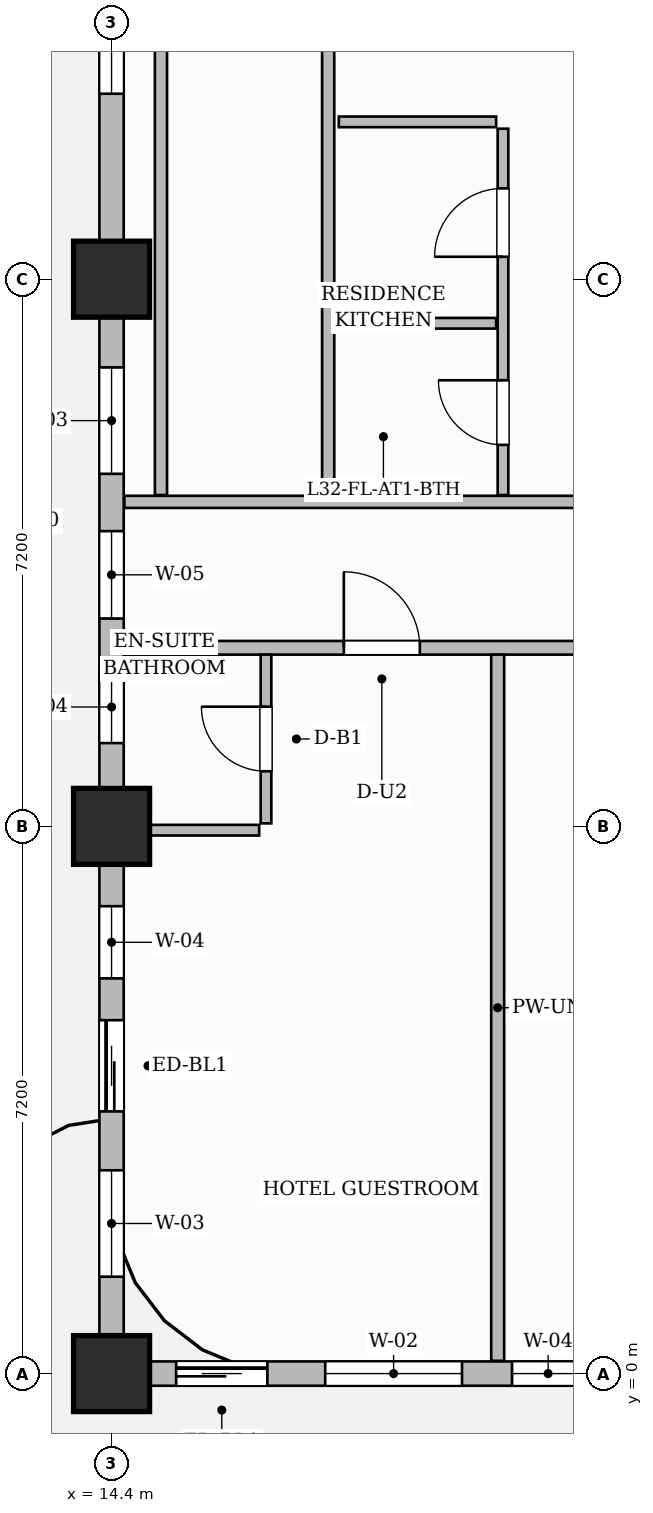
"""IFC4 building model, lengths in metres.
Left out: names, types, materials, properties, quantities, classifications, styles, units other than length and angle.
Written with IfcOpenShell. Run it as: python <this file> out.ifc"""

import sys

from ifc_helpers import new_model, si_unit, direction, frame, frame_2d, origin, origin_2d, place, context, subcontext, project, spatial, rectangle, extrude, source, transform, mapped, element, fill, save


model = new_model("IFC4")
c1 = context("Model", 3, precision=1e-05, world=origin(), true_north=direction((0.0, 1.0)))
c2 = subcontext(c1, "Body", "Model", "MODEL_VIEW")
j1 = project(units=[si_unit("LENGTHUNIT", "METRE"), si_unit("PLANEANGLEUNIT", "RADIAN")], contexts=[c1])
p1 = place(None, origin())
s1 = spatial("IfcSite", under=j1, at=p1, CompositionType="ELEMENT")
p2 = place(p1, origin())
s2 = spatial("IfcBuilding", under=s1, at=p2, CompositionType="ELEMENT")
p3 = place(p2, frame((0.0, 0.0, 130.3)))
s3 = spatial("IfcBuildingStorey", under=s2, at=p3, CompositionType="ELEMENT", Elevation=130.3)
m1 = source(origin(), c2, "Body", "SweptSolid", [
    extrude(rectangle(XDim=1.0, YDim=1.0, at=origin_2d()), origin(), (0.0, 0.0, 1.0), 3.7),
])
for number, where, z_axis, x_axis in (
    (1, (14.4, 0.0, 0.0), (0.0, 0.0, 1.0), (1.0, 0.0, 0.0)),
    (2, (14.4, 7.2, 0.0), (0.0, 0.0, 1.0), (1.0, 0.0, 0.0)),
    (3, (14.4, 14.4, 0.0), (0.0, 0.0, 1.0), (1.0, 0.0, 0.0)),
):
    element("IfcColumn", number, at=place(p3, frame(where, z_axis=z_axis, x_axis=x_axis)), inside=s3, PredefinedType="COLUMN", context=c2, shape_type="MappedRepresentation", body=[
        mapped(m1, transform((0.0, 0.0, 0.0), scale=1.0)),
    ])
p4 = place(p3, frame((14.568, 9.55, 0.0), z_axis=(0.0, 0.0, 1.0), x_axis=(1.0, 0.0, 0.0)))
e4 = element("IfcWall", 4, at=p4, inside=s3, PredefinedType="PARTITIONING", context=c2, shape_type="SweptSolid", body=[
    extrude(rectangle(XDim=15.542, YDim=0.18, at=frame_2d((7.771, 0.0))), origin(), (0.0, 0.0, 1.0), 3.45),
])
p5 = place(p4, frame((2.888, 0.0, 0.0)))
e5 = element("IfcOpeningElement", 5, at=p5, cuts=e4, PredefinedType="OPENING", context=c2, shape_type="SweptSolid", body=[
    extrude(rectangle(XDim=1.0, YDim=2.2, at=frame_2d((0.5, 1.1))), frame((0.0, 0.1, 0.0), z_axis=(0.0, -1.0, 0.0), x_axis=(1.0, 0.0, 0.0)), (0.0, 0.0, 1.0), 0.2),
])
p6 = place(p4, frame((5.965, 0.0, 0.0)))
e6 = element("IfcOpeningElement", 6, at=p6, cuts=e4, PredefinedType="OPENING", context=c2, shape_type="SweptSolid", body=[
    extrude(rectangle(XDim=1.05, YDim=2.25, at=frame_2d((0.525, 1.125))), frame((0.0, 0.1, 0.0), z_axis=(0.0, -1.0, 0.0), x_axis=(1.0, 0.0, 0.0)), (0.0, 0.0, 1.0), 0.2),
])
p7 = place(p4, frame((13.7, 0.0, 0.0)))
e7 = element("IfcOpeningElement", 7, at=p7, cuts=e4, PredefinedType="OPENING", context=c2, shape_type="SweptSolid", body=[
    extrude(rectangle(XDim=1.0, YDim=2.2, at=frame_2d((0.5, 1.1))), frame((0.0, 0.1, 0.0), z_axis=(0.0, -1.0, 0.0), x_axis=(1.0, 0.0, 0.0)), (0.0, 0.0, 1.0), 0.2),
])
p8 = place(p3, frame((14.568, 11.47, 0.0), z_axis=(0.0, 0.0, 1.0), x_axis=(1.0, 0.0, 0.0)))
e8 = element("IfcWall", 8, at=p8, inside=s3, PredefinedType="PARTITIONING", context=c2, shape_type="SweptSolid", body=[
    extrude(rectangle(XDim=15.542, YDim=0.16, at=frame_2d((7.771, 0.0))), origin(), (0.0, 0.0, 1.0), 3.45),
])
p9 = place(p8, frame((7.122, 0.0, 0.0)))
e9 = element("IfcOpeningElement", 9, at=p9, cuts=e8, PredefinedType="OPENING", context=c2, shape_type="SweptSolid", body=[
    extrude(rectangle(XDim=1.05, YDim=2.25, at=frame_2d((0.525, 1.125))), frame((0.0, 0.09, 0.0), z_axis=(0.0, -1.0, 0.0), x_axis=(1.0, 0.0, 0.0)), (0.0, 0.0, 1.0), 0.18),
])
p10 = place(p3, frame((19.48, 0.168, 0.0), z_axis=(0.0, 0.0, 1.0), x_axis=(0.0, 1.0, 0.0)))
e10 = element("IfcWall", 10, at=p10, inside=s3, PredefinedType="PARTITIONING", context=c2, shape_type="SweptSolid", body=[
    extrude(rectangle(XDim=9.292, YDim=0.17, at=frame_2d((4.646, 0.0))), origin(), (0.0, 0.0, 1.0), 3.45),
])
p11 = place(p3, frame((16.432, 7.24, 0.0), z_axis=(0.0, 0.0, 1.0), x_axis=(0.0, 1.0, 0.0)))
e11 = element("IfcWall", 11, at=p11, inside=s3, PredefinedType="PARTITIONING", context=c2, shape_type="SweptSolid", body=[
    extrude(rectangle(XDim=2.22, YDim=0.14, at=frame_2d((1.11, 0.0))), origin(), (0.0, 0.0, 1.0), 3.45),
])
p12 = place(p11, frame((0.685, 0.0, 0.0)))
e12 = element("IfcOpeningElement", 12, at=p12, cuts=e11, PredefinedType="OPENING", context=c2, shape_type="SweptSolid", body=[
    extrude(rectangle(XDim=0.85, YDim=2.1, at=frame_2d((0.425, 1.05))), frame((0.0, 0.08, 0.0), z_axis=(0.0, -1.0, 0.0), x_axis=(1.0, 0.0, 0.0)), (0.0, 0.0, 1.0), 0.16),
])
p13 = place(p3, frame((14.49, 7.15, 0.0), z_axis=(0.0, 0.0, 1.0), x_axis=(1.0, 0.0, 0.0)))
e13 = element("IfcWall", 13, at=p13, inside=s3, PredefinedType="PARTITIONING", context=c2, shape_type="SweptSolid", body=[
    extrude(rectangle(XDim=1.852, YDim=0.14, at=frame_2d((0.926, 0.0))), origin(), (0.0, 0.0, 1.0), 2.935),
])
for number, where, z_axis, x_axis in (
    (14, (15.05, 11.56, 0.0), (0.0, 0.0, 1.0), (0.0, 1.0, 0.0)),
    (15, (17.25, 11.56, 0.0), (0.0, 0.0, 1.0), (0.0, 1.0, 0.0)),
):
    element("IfcWall", number, at=place(p3, frame(where, z_axis=z_axis, x_axis=x_axis)), inside=s3, PredefinedType="PARTITIONING", context=c2, shape_type="SweptSolid", body=[
        extrude(rectangle(XDim=13.55, YDim=0.16, at=frame_2d((6.775, 0.0))), origin(), (0.0, 0.0, 1.0), 3.45),
    ])
p14 = place(p3, frame((19.55, 11.56, 0.0), z_axis=(0.0, 0.0, 1.0), x_axis=(0.0, 1.0, 0.0)))
e16 = element("IfcWall", 16, at=p14, inside=s3, PredefinedType="PARTITIONING", context=c2, shape_type="SweptSolid", body=[
    extrude(rectangle(XDim=4.82, YDim=0.14, at=frame_2d((2.41, 0.0))), origin(), (0.0, 0.0, 1.0), 3.45),
])
p15 = place(p14, frame((0.66, 0.0, 0.0)))
e17 = element("IfcOpeningElement", 17, at=p15, cuts=e16, PredefinedType="OPENING", context=c2, shape_type="SweptSolid", body=[
    extrude(rectangle(XDim=0.85, YDim=2.1, at=frame_2d((0.425, 1.05))), frame((0.0, 0.08, 0.0), z_axis=(0.0, -1.0, 0.0), x_axis=(1.0, 0.0, 0.0)), (0.0, 0.0, 1.0), 0.16),
])
p16 = place(p14, frame((3.135, 0.0, 0.0)))
e18 = element("IfcOpeningElement", 18, at=p16, cuts=e16, PredefinedType="OPENING", context=c2, shape_type="SweptSolid", body=[
    extrude(rectangle(XDim=0.9, YDim=2.15, at=frame_2d((0.45, 1.075))), frame((0.0, 0.08, 0.0), z_axis=(0.0, -1.0, 0.0), x_axis=(1.0, 0.0, 0.0)), (0.0, 0.0, 1.0), 0.16),
])
for number, where, z_axis, x_axis in (
    (19, (17.39, 13.82, 0.0), (0.0, 0.0, 1.0), (1.0, 0.0, 0.0)),
    (20, (17.39, 16.47, 0.0), (0.0, 0.0, 1.0), (1.0, 0.0, 0.0)),
):
    element("IfcWall", number, at=place(p3, frame(where, z_axis=z_axis, x_axis=x_axis)), inside=s3, PredefinedType="PARTITIONING", context=c2, shape_type="SweptSolid", body=[
        extrude(rectangle(XDim=2.07, YDim=0.14, at=frame_2d((1.035, 0.0))), origin(), (0.0, 0.0, 1.0), 3.45),
    ])
p17 = place(p3, frame((14.4, 0.0, 0.0), z_axis=(0.0, 0.0, 1.0), x_axis=(1.0, 0.0, 0.0)))
e21 = element("IfcWall", 21, at=p17, inside=s3, PredefinedType="SOLIDWALL", context=c2, shape_type="SweptSolid", body=[
    extrude(rectangle(XDim=35.4, YDim=0.32, at=frame_2d((17.7, 0.0))), origin(), (0.0, 0.0, 1.0), 2.935),
])
p18 = place(p17, frame((0.85, 0.0, 0.0)))
e22 = element("IfcOpeningElement", 22, at=p18, cuts=e21, PredefinedType="OPENING", context=c2, shape_type="SweptSolid", body=[
    extrude(rectangle(XDim=1.2, YDim=2.2, at=frame_2d((0.6, 1.1))), frame((0.0, 0.17, 0.0), z_axis=(0.0, -1.0, 0.0), x_axis=(1.0, 0.0, 0.0)), (0.0, 0.0, 1.0), 0.34),
])
p19 = place(p17, frame((2.811, 0.0, 0.8)))
e23 = element("IfcOpeningElement", 23, at=p19, cuts=e21, PredefinedType="OPENING", context=c2, shape_type="SweptSolid", body=[
    extrude(rectangle(XDim=1.8, YDim=1.85, at=frame_2d((0.9, 0.925))), frame((0.0, 0.17, 0.0), z_axis=(0.0, -1.0, 0.0), x_axis=(1.0, 0.0, 0.0)), (0.0, 0.0, 1.0), 0.34),
])
p20 = place(p17, frame((5.269, 0.0, 0.8)))
e24 = element("IfcOpeningElement", 24, at=p20, cuts=e21, PredefinedType="OPENING", context=c2, shape_type="SweptSolid", body=[
    extrude(rectangle(XDim=0.95, YDim=1.75, at=frame_2d((0.475, 0.875))), frame((0.0, 0.17, 0.0), z_axis=(0.0, -1.0, 0.0), x_axis=(1.0, 0.0, 0.0)), (0.0, 0.0, 1.0), 0.34),
])
p21 = place(p17, frame((8.389, 0.0, 0.8)))
e25 = element("IfcOpeningElement", 25, at=p21, cuts=e21, PredefinedType="OPENING", context=c2, shape_type="SweptSolid", body=[
    extrude(rectangle(XDim=1.8, YDim=1.85, at=frame_2d((0.9, 0.925))), frame((0.0, 0.17, 0.0), z_axis=(0.0, -1.0, 0.0), x_axis=(1.0, 0.0, 0.0)), (0.0, 0.0, 1.0), 0.34),
])
p22 = place(p17, frame((11.197, 0.0, 0.8)))
e26 = element("IfcOpeningElement", 26, at=p22, cuts=e21, PredefinedType="OPENING", context=c2, shape_type="SweptSolid", body=[
    extrude(rectangle(XDim=1.8, YDim=1.85, at=frame_2d((0.9, 0.925))), frame((0.0, 0.17, 0.0), z_axis=(0.0, -1.0, 0.0), x_axis=(1.0, 0.0, 0.0)), (0.0, 0.0, 1.0), 0.34),
])
p23 = place(p17, frame((16.804, 0.0, 0.8)))
e27 = element("IfcOpeningElement", 27, at=p23, cuts=e21, PredefinedType="OPENING", context=c2, shape_type="SweptSolid", body=[
    extrude(rectangle(XDim=1.8, YDim=1.85, at=frame_2d((0.9, 0.925))), frame((0.0, 0.17, 0.0), z_axis=(0.0, -1.0, 0.0), x_axis=(1.0, 0.0, 0.0)), (0.0, 0.0, 1.0), 0.34),
])
p24 = place(p17, frame((22.396, 0.0, 0.8)))
e28 = element("IfcOpeningElement", 28, at=p24, cuts=e21, PredefinedType="OPENING", context=c2, shape_type="SweptSolid", body=[
    extrude(rectangle(XDim=1.8, YDim=1.85, at=frame_2d((0.9, 0.925))), frame((0.0, 0.17, 0.0), z_axis=(0.0, -1.0, 0.0), x_axis=(1.0, 0.0, 0.0)), (0.0, 0.0, 1.0), 0.34),
])
p25 = place(p17, frame((25.629, 0.0, 0.8)))
e29 = element("IfcOpeningElement", 29, at=p25, cuts=e21, PredefinedType="OPENING", context=c2, shape_type="SweptSolid", body=[
    extrude(rectangle(XDim=0.95, YDim=1.75, at=frame_2d((0.475, 0.875))), frame((0.0, 0.17, 0.0), z_axis=(0.0, -1.0, 0.0), x_axis=(1.0, 0.0, 0.0)), (0.0, 0.0, 1.0), 0.34),
])
p26 = place(p17, frame((29.075, 0.0, 0.8)))
e30 = element("IfcOpeningElement", 30, at=p26, cuts=e21, PredefinedType="OPENING", context=c2, shape_type="SweptSolid", body=[
    extrude(rectangle(XDim=1.8, YDim=1.85, at=frame_2d((0.9, 0.925))), frame((0.0, 0.17, 0.0), z_axis=(0.0, -1.0, 0.0), x_axis=(1.0, 0.0, 0.0)), (0.0, 0.0, 1.0), 0.34),
])
p27 = place(p17, frame((32.125, 0.0, 0.8)))
e31 = element("IfcOpeningElement", 31, at=p27, cuts=e21, PredefinedType="OPENING", context=c2, shape_type="SweptSolid", body=[
    extrude(rectangle(XDim=1.8, YDim=1.85, at=frame_2d((0.9, 0.925))), frame((0.0, 0.17, 0.0), z_axis=(0.0, -1.0, 0.0), x_axis=(1.0, 0.0, 0.0)), (0.0, 0.0, 1.0), 0.34),
])
p28 = place(p3, frame((14.4, 0.05, 0.0), z_axis=(0.0, 0.0, 1.0), x_axis=(0.0, 1.0, 0.0)))
e32 = element("IfcWall", 32, at=p28, inside=s3, PredefinedType="SOLIDWALL", context=c2, shape_type="SweptSolid", body=[
    extrude(rectangle(XDim=20.6, YDim=0.32, at=frame_2d((10.3, 0.0))), origin(), (0.0, 0.0, 1.0), 2.935),
])
p29 = place(p28, frame((3.4, 0.0, 0.0)))
e33 = element("IfcOpeningElement", 33, at=p29, cuts=e32, PredefinedType="OPENING", context=c2, shape_type="SweptSolid", body=[
    extrude(rectangle(XDim=1.2, YDim=2.2, at=frame_2d((0.6, 1.1))), frame((0.0, 0.17, 0.0), z_axis=(0.0, -1.0, 0.0), x_axis=(1.0, 0.0, 0.0)), (0.0, 0.0, 1.0), 0.34),
])
p30 = place(p28, frame((1.225, 0.0, 0.8)))
e34 = element("IfcOpeningElement", 34, at=p30, cuts=e32, PredefinedType="OPENING", context=c2, shape_type="SweptSolid", body=[
    extrude(rectangle(XDim=1.4, YDim=1.85, at=frame_2d((0.7, 0.925))), frame((0.0, 0.17, 0.0), z_axis=(0.0, -1.0, 0.0), x_axis=(1.0, 0.0, 0.0)), (0.0, 0.0, 1.0), 0.34),
])
p31 = place(p28, frame((5.15, 0.0, 0.8)))
e35 = element("IfcOpeningElement", 35, at=p31, cuts=e32, PredefinedType="OPENING", context=c2, shape_type="SweptSolid", body=[
    extrude(rectangle(XDim=0.95, YDim=1.75, at=frame_2d((0.475, 0.875))), frame((0.0, 0.17, 0.0), z_axis=(0.0, -1.0, 0.0), x_axis=(1.0, 0.0, 0.0)), (0.0, 0.0, 1.0), 0.34),
])
p32 = place(p28, frame((8.246, 0.0, 0.8)))
e36 = element("IfcOpeningElement", 36, at=p32, cuts=e32, PredefinedType="OPENING", context=c2, shape_type="SweptSolid", body=[
    extrude(rectangle(XDim=0.95, YDim=1.75, at=frame_2d((0.475, 0.875))), frame((0.0, 0.17, 0.0), z_axis=(0.0, -1.0, 0.0), x_axis=(1.0, 0.0, 0.0)), (0.0, 0.0, 1.0), 0.34),
])
p33 = place(p28, frame((9.885, 0.0, 0.8)))
e37 = element("IfcOpeningElement", 37, at=p33, cuts=e32, PredefinedType="OPENING", context=c2, shape_type="SweptSolid", body=[
    extrude(rectangle(XDim=1.15, YDim=1.8, at=frame_2d((0.575, 0.9))), frame((0.0, 0.17, 0.0), z_axis=(0.0, -1.0, 0.0), x_axis=(1.0, 0.0, 0.0)), (0.0, 0.0, 1.0), 0.34),
])
p34 = place(p28, frame((11.789, 0.0, 0.8)))
e38 = element("IfcOpeningElement", 38, at=p34, cuts=e32, PredefinedType="OPENING", context=c2, shape_type="SweptSolid", body=[
    extrude(rectangle(XDim=1.4, YDim=1.85, at=frame_2d((0.7, 0.925))), frame((0.0, 0.17, 0.0), z_axis=(0.0, -1.0, 0.0), x_axis=(1.0, 0.0, 0.0)), (0.0, 0.0, 1.0), 0.34),
])
p35 = place(p28, frame((16.79, 0.0, 0.8)))
e39 = element("IfcOpeningElement", 39, at=p35, cuts=e32, PredefinedType="OPENING", context=c2, shape_type="SweptSolid", body=[
    extrude(rectangle(XDim=1.8, YDim=1.85, at=frame_2d((0.9, 0.925))), frame((0.0, 0.17, 0.0), z_axis=(0.0, -1.0, 0.0), x_axis=(1.0, 0.0, 0.0)), (0.0, 0.0, 1.0), 0.34),
])
m2 = source(origin(), c2, "Body", "SweptSolid", [
    extrude(rectangle(XDim=0.85, YDim=2.1, at=frame_2d((0.425, 1.05))), frame((0.0, 0.025, 0.0), z_axis=(0.0, -1.0, 0.0), x_axis=(1.0, 0.0, 0.0)), (0.0, 0.0, 1.0), 0.05),
])
p36 = place(p12, origin())
e40 = element("IfcDoor", 40, at=p36, inside=s3, OperationType="SINGLE_SWING_RIGHT", PredefinedType="DOOR", context=c2, shape_type="MappedRepresentation", body=[
    mapped(m2, transform((0.0, 0.0, 0.0), scale=1.0)),
])
fill(e12, e40)
m3 = source(origin(), c2, "Body", "SweptSolid", [
    extrude(rectangle(XDim=1.0, YDim=2.2, at=frame_2d((0.5, 1.1))), frame((0.0, 0.025, 0.0), z_axis=(0.0, -1.0, 0.0), x_axis=(1.0, 0.0, 0.0)), (0.0, 0.0, 1.0), 0.05),
])
p37 = place(p5, origin())
e41 = element("IfcDoor", 41, at=p37, inside=s3, OperationType="SINGLE_SWING_LEFT", PredefinedType="DOOR", context=c2, shape_type="MappedRepresentation", body=[
    mapped(m3, transform((0.0, 0.0, 0.0), scale=1.0)),
])
fill(e5, e41)
p38 = place(p15, origin())
e42 = element("IfcDoor", 42, at=p38, inside=s3, OperationType="SINGLE_SWING_RIGHT", PredefinedType="DOOR", context=c2, shape_type="MappedRepresentation", body=[
    mapped(m2, transform((0.0, 0.0, 0.0), scale=1.0)),
])
fill(e17, e42)
m4 = source(origin(), c2, "Body", "SweptSolid", [
    extrude(rectangle(XDim=0.9, YDim=2.15, at=frame_2d((0.45, 1.075))), frame((0.0, 0.025, 0.0), z_axis=(0.0, -1.0, 0.0), x_axis=(1.0, 0.0, 0.0)), (0.0, 0.0, 1.0), 0.05),
])
p39 = place(p16, origin())
e43 = element("IfcDoor", 43, at=p39, inside=s3, OperationType="SINGLE_SWING_LEFT", PredefinedType="DOOR", context=c2, shape_type="MappedRepresentation", body=[
    mapped(m4, transform((0.0, 0.0, 0.0), scale=1.0)),
])
fill(e18, e43)
m5 = source(origin(), c2, "Body", "SweptSolid", [
    extrude(rectangle(XDim=1.2, YDim=2.2, at=frame_2d((0.6, 1.1))), frame((0.0, 0.025, 0.0), z_axis=(0.0, -1.0, 0.0), x_axis=(1.0, 0.0, 0.0)), (0.0, 0.0, 1.0), 0.05),
])
p40 = place(p18, origin())
e44 = element("IfcDoor", 44, at=p40, inside=s3, OperationType="SLIDING_TO_LEFT", PredefinedType="DOOR", context=c2, shape_type="MappedRepresentation", body=[
    mapped(m5, transform((0.0, 0.0, 0.0), scale=1.0)),
])
fill(e22, e44)
p41 = place(p29, origin())
e45 = element("IfcDoor", 45, at=p41, inside=s3, OperationType="SLIDING_TO_LEFT", PredefinedType="DOOR", context=c2, shape_type="MappedRepresentation", body=[
    mapped(m5, transform((0.0, 0.0, 0.0), scale=1.0)),
])
fill(e33, e45)
m6 = source(origin(), c2, "Body", "SweptSolid", [
    extrude(rectangle(XDim=1.8, YDim=1.85, at=frame_2d((0.9, 0.925))), frame((0.0, 0.03, 0.0), z_axis=(0.0, -1.0, 0.0), x_axis=(1.0, 0.0, 0.0)), (0.0, 0.0, 1.0), 0.06),
])
p42 = place(p19, origin())
e46 = element("IfcWindow", 46, at=p42, inside=s3, PartitioningType="DOUBLE_PANEL_VERTICAL", PredefinedType="WINDOW", context=c2, shape_type="MappedRepresentation", body=[
    mapped(m6, transform((0.0, 0.0, 0.0), scale=1.0)),
])
fill(e23, e46)
m7 = source(origin(), c2, "Body", "SweptSolid", [
    extrude(rectangle(XDim=0.95, YDim=1.75, at=frame_2d((0.475, 0.875))), frame((0.0, 0.03, 0.0), z_axis=(0.0, -1.0, 0.0), x_axis=(1.0, 0.0, 0.0)), (0.0, 0.0, 1.0), 0.06),
])
p43 = place(p20, origin())
e47 = element("IfcWindow", 47, at=p43, inside=s3, PartitioningType="SINGLE_PANEL", PredefinedType="WINDOW", context=c2, shape_type="MappedRepresentation", body=[
    mapped(m7, transform((0.0, 0.0, 0.0), scale=1.0)),
])
fill(e24, e47)
m8 = source(origin(), c2, "Body", "SweptSolid", [
    extrude(rectangle(XDim=1.4, YDim=1.85, at=frame_2d((0.7, 0.925))), frame((0.0, 0.03, 0.0), z_axis=(0.0, -1.0, 0.0), x_axis=(1.0, 0.0, 0.0)), (0.0, 0.0, 1.0), 0.06),
])
p44 = place(p30, origin())
e48 = element("IfcWindow", 48, at=p44, inside=s3, PartitioningType="SINGLE_PANEL", PredefinedType="WINDOW", context=c2, shape_type="MappedRepresentation", body=[
    mapped(m8, transform((0.0, 0.0, 0.0), scale=1.0)),
])
fill(e34, e48)
p45 = place(p31, origin())
e49 = element("IfcWindow", 49, at=p45, inside=s3, PartitioningType="SINGLE_PANEL", PredefinedType="WINDOW", context=c2, shape_type="MappedRepresentation", body=[
    mapped(m7, transform((0.0, 0.0, 0.0), scale=1.0)),
])
fill(e35, e49)
p46 = place(p32, origin())
e50 = element("IfcWindow", 50, at=p46, inside=s3, PartitioningType="SINGLE_PANEL", PredefinedType="WINDOW", context=c2, shape_type="MappedRepresentation", body=[
    mapped(m7, transform((0.0, 0.0, 0.0), scale=1.0)),
])
fill(e36, e50)
m9 = source(origin(), c2, "Body", "SweptSolid", [
    extrude(rectangle(XDim=1.15, YDim=1.8, at=frame_2d((0.575, 0.9))), frame((0.0, 0.03, 0.0), z_axis=(0.0, -1.0, 0.0), x_axis=(1.0, 0.0, 0.0)), (0.0, 0.0, 1.0), 0.06),
])
p47 = place(p33, origin())
e51 = element("IfcWindow", 51, at=p47, inside=s3, PartitioningType="SINGLE_PANEL", PredefinedType="WINDOW", context=c2, shape_type="MappedRepresentation", body=[
    mapped(m9, transform((0.0, 0.0, 0.0), scale=1.0)),
])
fill(e37, e51)
p48 = place(p34, origin())
e52 = element("IfcWindow", 52, at=p48, inside=s3, PartitioningType="SINGLE_PANEL", PredefinedType="WINDOW", context=c2, shape_type="MappedRepresentation", body=[
    mapped(m8, transform((0.0, 0.0, 0.0), scale=1.0)),
])
fill(e38, e52)
p49 = place(p35, origin())
e53 = element("IfcWindow", 53, at=p49, inside=s3, PartitioningType="DOUBLE_PANEL_VERTICAL", PredefinedType="WINDOW", context=c2, shape_type="MappedRepresentation", body=[
    mapped(m6, transform((0.0, 0.0, 0.0), scale=1.0)),
])
fill(e39, e53)
save(model, sys.argv[1])
